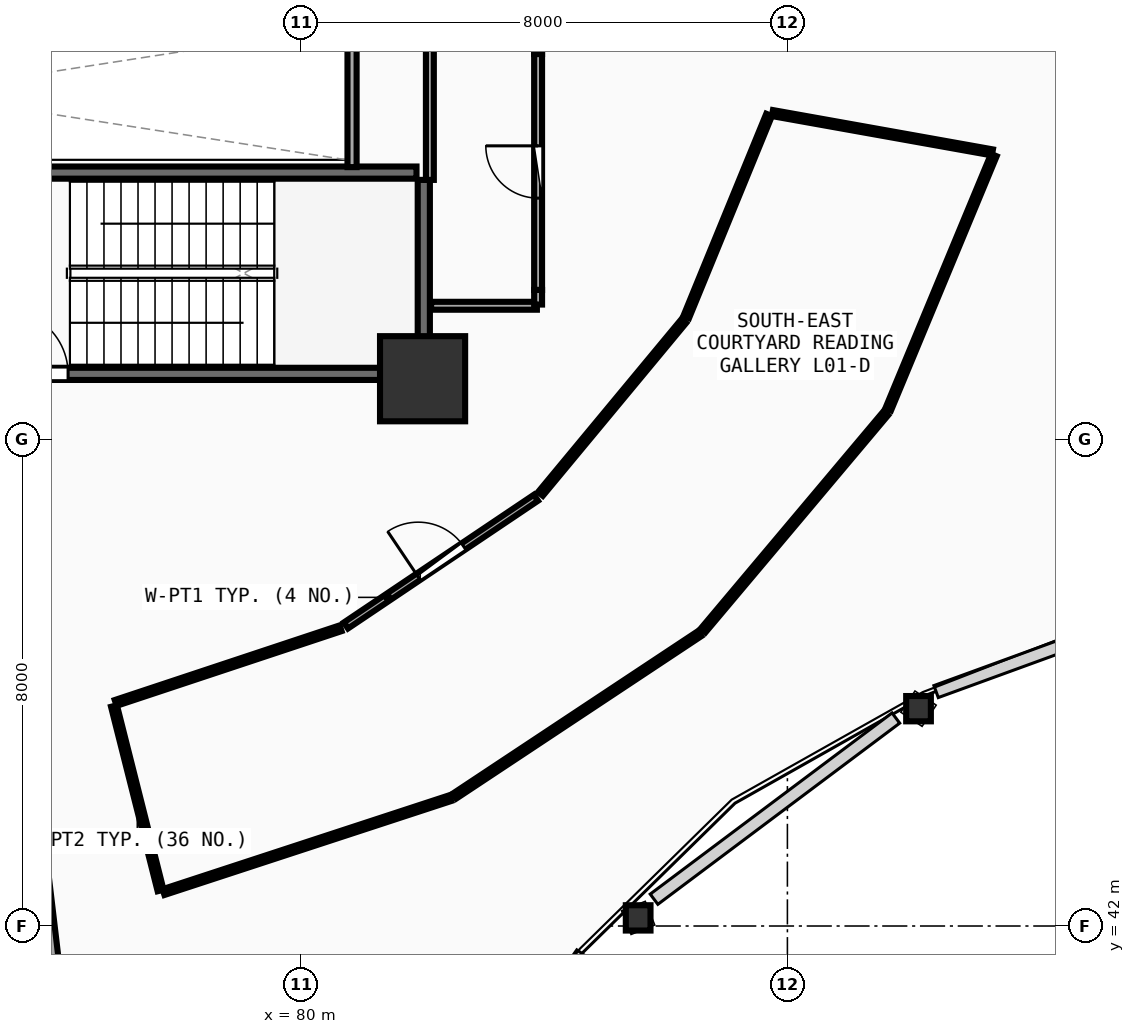
"""IFC4 building model, lengths in metres.
Left out: names, types, materials, properties, quantities, classifications, styles, units other than length and angle.
Written with IfcOpenShell. Run it as: python <this file> out.ifc"""

import sys

from ifc_helpers import new_model, si_unit, direction, frame, frame_2d, origin, origin_2d, place, context, subcontext, project, spatial, rectangle, i_section, extrude, element, fill, save


model = new_model("IFC4")
c1 = context("Model", 3, precision=1e-05, world=origin(), true_north=direction((0.0, 1.0)))
c2 = subcontext(c1, "Body", "Model", "MODEL_VIEW")
j1 = project(units=[si_unit("LENGTHUNIT", "METRE"), si_unit("PLANEANGLEUNIT", "RADIAN")], contexts=[c1])
p1 = place(None, origin())
s1 = spatial("IfcSite", under=j1, at=p1, CompositionType="ELEMENT")
p2 = place(p1, origin())
s2 = spatial("IfcBuilding", under=s1, at=p2, CompositionType="ELEMENT")
p3 = place(p2, frame((0.0, 0.0, 4.5)))
s3 = spatial("IfcBuildingStorey", under=s2, at=p3, CompositionType="ELEMENT", Elevation=4.5)
p4 = place(p3, frame((82.0, 51.0, 0.0), z_axis=(0.0, 0.0, 1.0), x_axis=(1.0, 0.0, 0.0)))
e1 = element("IfcColumn", 1, at=p4, inside=s3, PredefinedType="PILASTER", context=c2, shape_type="SweptSolid", body=[
    extrude(rectangle(XDim=1.4, YDim=1.4, at=origin_2d()), origin(), (0.0, 0.0, 1.0), 4.5),
])
for number, where, z_axis, x_axis in (
    (2, (85.546, 42.134, 0.0), (0.0, 0.0, 1.0), (1.0, 0.0, 0.0)),
    (3, (90.156, 45.574, 0.0), (0.0, 0.0, 1.0), (1.0, 0.0, 0.0)),
):
    element("IfcColumn", number, at=place(p3, frame(where, z_axis=z_axis, x_axis=x_axis)), inside=s3, PredefinedType="COLUMN", context=c2, shape_type="SweptSolid", body=[
        extrude(i_section(OverallWidth=0.406, OverallDepth=0.416, WebThickness=0.029, FlangeThickness=0.048, FilletRadius=0.015, at=origin_2d()), origin(), (0.0, 0.0, 1.0), 4.5),
    ])
p5 = place(p3, frame((74.0, 51.08, 0.0), z_axis=(0.0, 0.0, 1.0), x_axis=(1.0, 0.0, 0.0)))
e4 = element("IfcWall", 4, at=p5, inside=s3, PredefinedType="SHEAR", context=c2, shape_type="SweptSolid", body=[
    extrude(rectangle(XDim=7.9, YDim=0.2, at=frame_2d((3.95, 0.0))), origin(), (0.0, 0.0, 1.0), 4.2),
])
p6 = place(p5, frame((1.12, 0.0, 0.0)))
e5 = element("IfcOpeningElement", 5, at=p6, cuts=e4, PredefinedType="OPENING", context=c2, shape_type="SweptSolid", body=[
    extrude(rectangle(XDim=1.05, YDim=2.1, at=frame_2d((0.525, 1.05))), frame((0.0, 0.11, 0.0), z_axis=(0.0, -1.0, 0.0), x_axis=(1.0, 0.0, 0.0)), (0.0, 0.0, 1.0), 0.22),
])
p7 = place(p3, frame((82.02, 51.2, 0.0), z_axis=(0.0, 0.0, 1.0), x_axis=(0.0, 1.0, 0.0)))
e6 = element("IfcWall", 6, at=p7, inside=s3, PredefinedType="SHEAR", context=c2, shape_type="SweptSolid", body=[
    extrude(rectangle(XDim=3.07, YDim=0.2, at=frame_2d((1.535, 0.0))), origin(), (0.0, 0.0, 1.0), 4.2),
])
p8 = place(p3, frame((81.9, 54.39, 0.0), z_axis=(0.0, 0.0, 1.0), x_axis=(-1.0, 0.0, 0.0)))
e7 = element("IfcWall", 7, at=p8, inside=s3, PredefinedType="SHEAR", context=c2, shape_type="SweptSolid", body=[
    extrude(rectangle(XDim=8.46, YDim=0.2, at=frame_2d((4.23, 0.0))), origin(), (0.0, 0.0, 1.0), 4.2),
])
p9 = place(p3, frame((80.84, 54.48, 0.0), z_axis=(0.0, 0.0, 1.0), x_axis=(0.0, 1.0, 0.0)))
e8 = element("IfcWall", 8, at=p9, inside=s3, PredefinedType="PARTITIONING", context=c2, shape_type="SweptSolid", body=[
    extrude(rectangle(XDim=2.29, YDim=0.15, at=frame_2d((1.145, 0.0))), origin(), (0.0, 0.0, 1.0), 4.19),
])
p10 = place(p3, frame((83.9, 52.46, 0.0), z_axis=(0.0, 0.0, 1.0), x_axis=(0.0, 1.0, 0.0)))
e9 = element("IfcWall", 9, at=p10, inside=s3, PredefinedType="PLUMBINGWALL", context=c2, shape_type="SweptSolid", body=[
    extrude(rectangle(XDim=3.88, YDim=0.13, at=frame_2d((1.94, 0.0))), origin(), (0.0, 0.0, 1.0), 4.19),
])
p11 = place(p10, frame((1.51, 0.0, 0.0)))
e10 = element("IfcOpeningElement", 10, at=p11, cuts=e9, PredefinedType="OPENING", context=c2, shape_type="SweptSolid", body=[
    extrude(rectangle(XDim=0.86, YDim=2.05, at=frame_2d((0.43, 1.025))), frame((0.0, 0.075, 0.0), z_axis=(0.0, -1.0, 0.0), x_axis=(1.0, 0.0, 0.0)), (0.0, 0.0, 1.0), 0.15),
])
p12 = place(p3, frame((80.74, 46.942, 0.0), z_axis=(0.0, 0.0, 1.0), x_axis=(0.829949208051, 0.557838966061, 0.0)))
e11 = element("IfcWall", 11, at=p12, inside=s3, PredefinedType="PARTITIONING", context=c2, shape_type="SweptSolid", body=[
    extrude(rectangle(XDim=3.765, YDim=0.12, at=frame_2d((1.882, 0.0))), origin(), (0.0, 0.0, 1.0), 3.585),
])
p13 = place(p12, frame((1.432, 0.0, 0.0)))
e12 = element("IfcOpeningElement", 12, at=p13, cuts=e11, PredefinedType="OPENING", context=c2, shape_type="SweptSolid", body=[
    extrude(rectangle(XDim=0.9, YDim=2.08, at=frame_2d((0.45, 1.04))), frame((0.0, 0.07, 0.0), z_axis=(0.0, -1.0, 0.0), x_axis=(1.0, 0.0, 0.0)), (0.0, 0.0, 1.0), 0.14),
])
p14 = place(p3, frame((82.14, 52.2, 0.0), z_axis=(0.0, 0.0, 1.0), x_axis=(1.0, 0.0, 0.0)))
e13 = element("IfcWall", 13, at=p14, inside=s3, PredefinedType="PLUMBINGWALL", context=c2, shape_type="SweptSolid", body=[
    extrude(rectangle(XDim=1.74, YDim=0.13, at=frame_2d((0.87, 0.0))), origin(), (0.0, 0.0, 1.0), 3.485),
])
for number, where, z_axis, x_axis in (
    (14, (83.9, 52.22, 0.0), (0.0, 0.0, 1.0), (0.0, 1.0, 0.0)),
    (15, (83.9, 56.34, 0.0), (0.0, 0.0, 1.0), (0.0, 1.0, 0.0)),
):
    element("IfcWall", number, at=place(p3, frame(where, z_axis=z_axis, x_axis=x_axis)), inside=s3, PredefinedType="PLUMBINGWALL", context=c2, shape_type="SweptSolid", body=[
        extrude(rectangle(XDim=0.24, YDim=0.13, at=frame_2d((0.12, 0.0))), origin(), (0.0, 0.0, 1.0), 4.19),
    ])
p15 = place(p3, frame((82.12, 56.58, 0.0), z_axis=(0.0, 0.0, 1.0), x_axis=(0.0, -1.0, 0.0)))
e16 = element("IfcWall", 16, at=p15, inside=s3, PredefinedType="PLUMBINGWALL", context=c2, shape_type="SweptSolid", body=[
    extrude(rectangle(XDim=2.31, YDim=0.13, at=frame_2d((1.155, 0.0))), origin(), (0.0, 0.0, 1.0), 3.485),
])
p16 = place(p3, frame((75.47, 45.409, 0.0), z_axis=(0.0, 0.0, 1.0), x_axis=(0.117716479822, -0.993047244787, 0.0)))
e17 = element("IfcWall", 17, at=p16, inside=s3, PredefinedType="PARTITIONING", context=c2, shape_type="SweptSolid", body=[
    extrude(rectangle(XDim=10.115, YDim=0.15, at=frame_2d((5.057, 0.0))), origin(), (0.0, 0.0, 1.0), 3.885),
])
p17 = place(p3, frame((76.953, 45.669, 0.0), z_axis=(0.0, 0.0, 1.0), x_axis=(0.949089658177, 0.31500606461, 0.0)))
e18 = element("IfcWall", 18, at=p17, inside=s3, PredefinedType="PARTITIONING", context=c2, shape_type="SweptSolid", body=[
    extrude(rectangle(XDim=3.898, YDim=0.1, at=frame_2d((1.949, 0.0))), origin(), (0.0, 0.0, 1.0), 4.19),
])
p18 = place(p3, frame((83.939, 49.107, 0.0), z_axis=(0.0, 0.0, 1.0), x_axis=(0.638393231466, 0.769710388405, 0.0)))
e19 = element("IfcWall", 19, at=p18, inside=s3, PredefinedType="PARTITIONING", context=c2, shape_type="SweptSolid", body=[
    extrude(rectangle(XDim=3.69, YDim=0.1, at=frame_2d((1.845, 0.0))), origin(), (0.0, 0.0, 1.0), 3.585),
])
p19 = place(p3, frame((86.336, 52.015, 0.0), z_axis=(0.0, 0.0, 1.0), x_axis=(0.379262523909, 0.925289110472, 0.0)))
e20 = element("IfcWall", 20, at=p19, inside=s3, PredefinedType="PARTITIONING", context=c2, shape_type="SweptSolid", body=[
    extrude(rectangle(XDim=3.593, YDim=0.1, at=frame_2d((1.796, 0.0))), origin(), (0.0, 0.0, 1.0), 4.19),
])
p20 = place(p3, frame((87.753, 55.369, 0.0), z_axis=(0.0, 0.0, 1.0), x_axis=(0.98438649623, -0.176020527328, 0.0)))
e21 = element("IfcWall", 21, at=p20, inside=s3, PredefinedType="PARTITIONING", context=c2, shape_type="SweptSolid", body=[
    extrude(rectangle(XDim=3.676, YDim=0.1, at=frame_2d((1.838, 0.0))), origin(), (0.0, 0.0, 1.0), 3.945),
])
p21 = place(p3, frame((91.396, 54.678, 0.0), z_axis=(0.0, 0.0, 1.0), x_axis=(-0.383734407675, -0.923443503614, 0.0)))
e22 = element("IfcWall", 22, at=p21, inside=s3, PredefinedType="PARTITIONING", context=c2, shape_type="SweptSolid", body=[
    extrude(rectangle(XDim=4.527, YDim=0.1, at=frame_2d((2.263, 0.0))), origin(), (0.0, 0.0, 1.0), 3.585),
])
p22 = place(p3, frame((89.617, 50.43, 0.0), z_axis=(0.0, 0.0, 1.0), x_axis=(-0.643707173648, -0.765271895861, 0.0)))
e23 = element("IfcWall", 23, at=p22, inside=s3, PredefinedType="PARTITIONING", context=c2, shape_type="SweptSolid", body=[
    extrude(rectangle(XDim=4.667, YDim=0.1, at=frame_2d((2.333, 0.0))), origin(), (0.0, 0.0, 1.0), 3.585),
])
p23 = place(p3, frame((86.554, 46.806, 0.0), z_axis=(0.0, 0.0, 1.0), x_axis=(-0.833594148674, -0.552377402956, 0.0)))
e24 = element("IfcWall", 24, at=p23, inside=s3, PredefinedType="PARTITIONING", context=c2, shape_type="SweptSolid", body=[
    extrude(rectangle(XDim=4.831, YDim=0.1, at=frame_2d((2.416, 0.0))), origin(), (0.0, 0.0, 1.0), 3.585),
])
p24 = place(p3, frame((82.455, 44.103, 0.0), z_axis=(0.0, 0.0, 1.0), x_axis=(-0.950308776872, -0.311308895794, 0.0)))
e25 = element("IfcWall", 25, at=p24, inside=s3, PredefinedType="PARTITIONING", context=c2, shape_type="SweptSolid", body=[
    extrude(rectangle(XDim=4.963, YDim=0.1, at=frame_2d((2.481, 0.0))), origin(), (0.0, 0.0, 1.0), 3.585),
])
p25 = place(p3, frame((77.691, 42.584, 0.0), z_axis=(0.0, 0.0, 1.0), x_axis=(-0.244940078033, 0.969538219037, 0.0)))
e26 = element("IfcWall", 26, at=p25, inside=s3, PredefinedType="PARTITIONING", context=c2, shape_type="SweptSolid", body=[
    extrude(rectangle(XDim=3.129, YDim=0.1, at=frame_2d((1.564, 0.0))), origin(), (0.0, 0.0, 1.0), 3.945),
])
p26 = place(p6, origin())
e27 = element("IfcDoor", 27, at=p26, inside=s3, OperationType="SINGLE_SWING_LEFT", PredefinedType="DOOR", context=c2, shape_type="SweptSolid", body=[
    extrude(rectangle(XDim=1.05, YDim=2.1, at=frame_2d((0.525, 1.05))), frame((0.0, 0.025, 0.0), z_axis=(0.0, -1.0, 0.0), x_axis=(1.0, 0.0, 0.0)), (0.0, 0.0, 1.0), 0.05),
])
fill(e5, e27)
p27 = place(p11, origin())
e28 = element("IfcDoor", 28, at=p27, inside=s3, OperationType="SINGLE_SWING_RIGHT", PredefinedType="DOOR", context=c2, shape_type="SweptSolid", body=[
    extrude(rectangle(XDim=0.86, YDim=2.05, at=frame_2d((0.43, 1.025))), frame((0.0, 0.025, 0.0), z_axis=(0.0, -1.0, 0.0), x_axis=(1.0, 0.0, 0.0)), (0.0, 0.0, 1.0), 0.05),
])
fill(e10, e28)
p28 = place(p13, origin())
e29 = element("IfcDoor", 29, at=p28, inside=s3, OperationType="SINGLE_SWING_LEFT", PredefinedType="DOOR", context=c2, shape_type="SweptSolid", body=[
    extrude(rectangle(XDim=0.9, YDim=2.08, at=frame_2d((0.45, 1.04))), frame((0.0, 0.025, 0.0), z_axis=(0.0, -1.0, 0.0), x_axis=(1.0, 0.0, 0.0)), (0.0, 0.0, 1.0), 0.05),
])
fill(e12, e29)
save(model, sys.argv[1])
